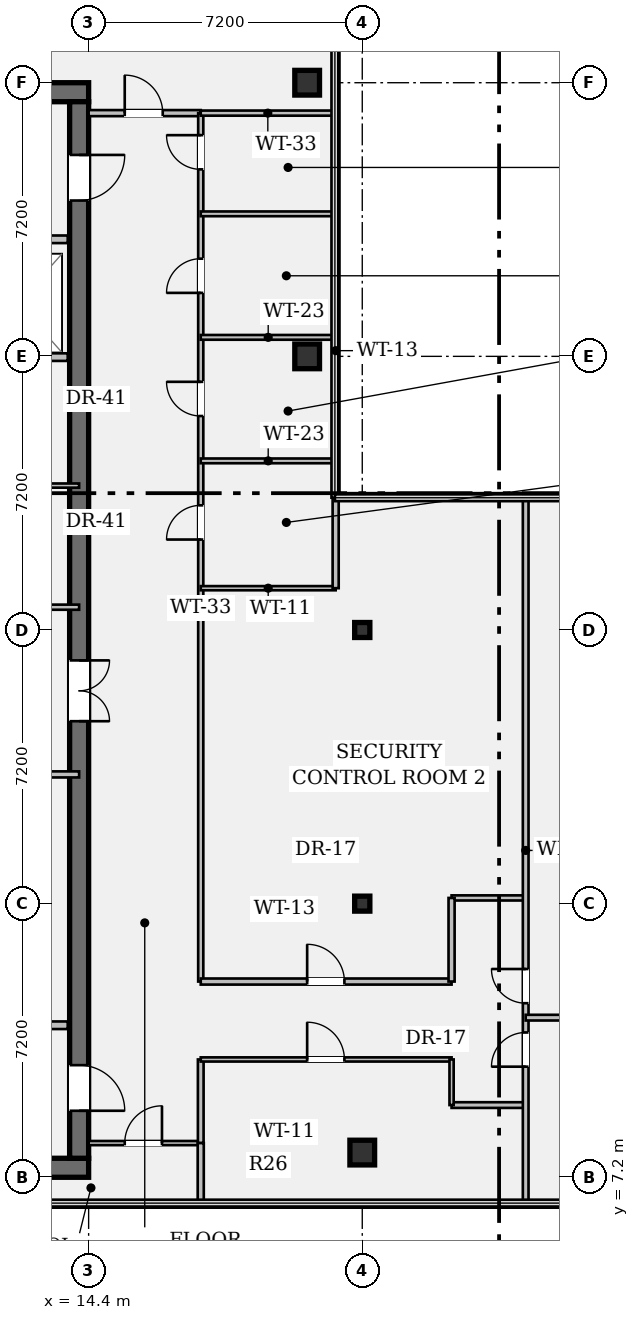
"""IFC4 building model, lengths in metres.
Left out: names, types, materials, properties, quantities, classifications, styles, units other than length and angle.
Written with IfcOpenShell. Run it as: python <this file> out.ifc"""

import sys

from ifc_helpers import new_model, si_unit, direction, frame, frame_2d, origin, origin_2d, place, context, subcontext, project, spatial, rectangle, hollow_rectangle, i_section, extrude, element, fill, save


model = new_model("IFC4")
c1 = context("Model", 3, precision=1e-05, world=origin(), true_north=direction((0.0, 1.0)))
c2 = subcontext(c1, "Body", "Model", "MODEL_VIEW")
j1 = project(units=[si_unit("LENGTHUNIT", "METRE"), si_unit("PLANEANGLEUNIT", "RADIAN")], contexts=[c1])
p1 = place(None, origin())
s1 = spatial("IfcSite", under=j1, at=p1, CompositionType="ELEMENT")
p2 = place(p1, origin())
s2 = spatial("IfcBuilding", under=s1, at=p2, CompositionType="ELEMENT")
p3 = place(p2, frame((0.0, 0.0, 248.15)))
s3 = spatial("IfcBuildingStorey", under=s2, at=p3, CompositionType="ELEMENT", Elevation=248.15)
for number, where, z_axis, x_axis in (
    (1, (0.5, 7.45, 0.0), (0.0, 0.0, 1.0), (1.0, 0.0, 0.0)),
    (2, (0.5, 35.75, 0.0), (0.0, 0.0, 1.0), (1.0, 0.0, 0.0)),
):
    element("IfcWall", number, at=place(p3, frame(where, z_axis=z_axis, x_axis=x_axis)), inside=s3, PredefinedType="SHEAR", context=c2, shape_type="SweptSolid", body=[
        extrude(rectangle(XDim=13.9, YDim=0.5, at=frame_2d((6.95, 0.0))), origin(), (0.0, 0.0, 1.0), 3.24),
    ])
p4 = place(p3, frame((14.15, 35.5, 0.0), z_axis=(0.0, 0.0, 1.0), x_axis=(0.0, -1.0, 0.0)))
e3 = element("IfcWall", 3, at=p4, inside=s3, PredefinedType="SHEAR", context=c2, shape_type="SweptSolid", body=[
    extrude(rectangle(XDim=27.8, YDim=0.5, at=frame_2d((13.9, 0.0))), origin(), (0.0, 0.0, 1.0), 3.24),
])
p5 = place(p4, frame((1.4, 0.0, 0.0)))
e4 = element("IfcOpeningElement", 4, at=p5, cuts=e3, PredefinedType="OPENING", context=c2, shape_type="SweptSolid", body=[
    extrude(rectangle(XDim=1.2, YDim=2.15, at=frame_2d((0.6, 1.075))), frame((0.0, 0.262, 0.0), z_axis=(0.0, -1.0, 0.0), x_axis=(1.0, 0.0, 0.0)), (0.0, 0.0, 1.0), 0.524),
])
p6 = place(p4, frame((25.35, 0.0, 0.0)))
e5 = element("IfcOpeningElement", 5, at=p6, cuts=e3, PredefinedType="OPENING", context=c2, shape_type="SweptSolid", body=[
    extrude(rectangle(XDim=1.2, YDim=2.15, at=frame_2d((0.6, 1.075))), frame((0.0, 0.262, 0.0), z_axis=(0.0, -1.0, 0.0), x_axis=(1.0, 0.0, 0.0)), (0.0, 0.0, 1.0), 0.524),
])
p7 = place(p4, frame((14.7, 0.0, 0.0)))
e6 = element("IfcOpeningElement", 6, at=p7, cuts=e3, PredefinedType="OPENING", context=c2, shape_type="SweptSolid", body=[
    extrude(rectangle(XDim=1.6, YDim=2.2, at=frame_2d((0.8, 1.1))), frame((0.0, 0.262, 0.0), z_axis=(0.0, -1.0, 0.0), x_axis=(1.0, 0.0, 0.0)), (0.0, 0.0, 1.0), 0.524),
])
for number, where, z_axis, x_axis in (
    (7, (20.15, 28.8, 0.0), (0.0, 0.0, 1.0), (1.0, 0.0, 0.0)),
    (8, (20.15, 36.0, 0.0), (0.0, 0.0, 1.0), (1.0, 0.0, 0.0)),
    (9, (21.6, 7.85, 0.0), (0.0, 0.0, 1.0), (1.0, 0.0, 0.0)),
):
    element("IfcColumn", number, at=place(p3, frame(where, z_axis=z_axis, x_axis=x_axis)), inside=s3, PredefinedType="COLUMN", context=c2, shape_type="SweptSolid", body=[
        extrude(hollow_rectangle(XDim=0.65, YDim=0.65, WallThickness=0.04, at=origin_2d()), origin(), (0.0, 0.0, 1.0), 3.24),
    ])
for number, where, z_axis, x_axis in (
    (10, (21.6, 14.4, 0.0), (0.0, 0.0, 1.0), (1.0, 0.0, 0.0)),
    (11, (21.6, 21.6, 0.0), (0.0, 0.0, 1.0), (1.0, 0.0, 0.0)),
):
    element("IfcColumn", number, at=place(p3, frame(where, z_axis=z_axis, x_axis=x_axis)), inside=s3, PredefinedType="COLUMN", context=c2, shape_type="SweptSolid", body=[
        extrude(i_section(OverallWidth=0.399, OverallDepth=0.394, WebThickness=0.023, FlangeThickness=0.037, FilletRadius=0.018, at=origin_2d()), origin(), (0.0, 0.0, 1.0), 3.24),
    ])
p8 = place(p3, frame((8.7, 31.88, 0.0), z_axis=(0.0, 0.0, 1.0), x_axis=(1.0, 0.0, 0.0)))
e12 = element("IfcWall", 12, at=p8, inside=s3, PredefinedType="PARTITIONING", context=c2, shape_type="SweptSolid", body=[
    extrude(rectangle(XDim=5.15, YDim=0.2, at=frame_2d((2.575, 0.0))), origin(), (0.0, 0.0, 1.0), 3.24),
])
p9 = place(p8, frame((0.75, 0.0, 0.0)))
e13 = element("IfcOpeningElement", 13, at=p9, cuts=e12, PredefinedType="OPENING", context=c2, shape_type="SweptSolid", body=[
    extrude(rectangle(XDim=1.2, YDim=2.2, at=frame_2d((0.6, 1.1))), frame((0.0, 0.112, 0.0), z_axis=(0.0, -1.0, 0.0), x_axis=(1.0, 0.0, 0.0)), (0.0, 0.0, 1.0), 0.224),
])
p10 = place(p8, frame((3.25, 0.0, 0.0)))
e14 = element("IfcOpeningElement", 14, at=p10, cuts=e12, PredefinedType="OPENING", context=c2, shape_type="SweptSolid", body=[
    extrude(rectangle(XDim=1.2, YDim=2.2, at=frame_2d((0.6, 1.1))), frame((0.0, 0.112, 0.0), z_axis=(0.0, -1.0, 0.0), x_axis=(1.0, 0.0, 0.0)), (0.0, 0.0, 1.0), 0.224),
])
for number, where, z_axis, x_axis in (
    (15, (8.7, 11.2, 0.0), (0.0, 0.0, 1.0), (1.0, 0.0, 0.0)),
    (16, (8.7, 28.78, 0.0), (0.0, 0.0, 1.0), (1.0, 0.0, 0.0)),
):
    element("IfcWall", number, at=place(p3, frame(where, z_axis=z_axis, x_axis=x_axis)), inside=s3, PredefinedType="PARTITIONING", context=c2, shape_type="SweptSolid", body=[
        extrude(rectangle(XDim=5.15, YDim=0.2, at=frame_2d((2.575, 0.0))), origin(), (0.0, 0.0, 1.0), 3.24),
    ])
p11 = place(p3, frame((7.1, 22.2, 0.0), z_axis=(0.0, 0.0, 1.0), x_axis=(1.0, 0.0, 0.0)))
e17 = element("IfcWall", 17, at=p11, inside=s3, PredefinedType="PARTITIONING", context=c2, shape_type="SweptSolid", body=[
    extrude(rectangle(XDim=7.05, YDim=0.135, at=frame_2d((3.525, 0.0))), origin(), (0.0, 0.0, 1.0), 3.24),
])
p12 = place(p3, frame((7.1, 25.4, 0.0), z_axis=(0.0, 0.0, 1.0), x_axis=(1.0, 0.0, 0.0)))
e18 = element("IfcWall", 18, at=p12, inside=s3, PredefinedType="PARTITIONING", context=c2, shape_type="SweptSolid", body=[
    extrude(rectangle(XDim=7.05, YDim=0.11, at=frame_2d((3.525, 0.0))), origin(), (0.0, 0.0, 1.0), 3.24),
])
p13 = place(p3, frame((5.15, 17.8, 0.0), z_axis=(0.0, 0.0, 1.0), x_axis=(1.0, 0.0, 0.0)))
e19 = element("IfcWall", 19, at=p13, inside=s3, PredefinedType="PARTITIONING", context=c2, shape_type="SweptSolid", body=[
    extrude(rectangle(XDim=9.0, YDim=0.16, at=frame_2d((4.5, 0.0))), origin(), (0.0, 0.0, 1.0), 3.24),
])
p14 = place(p13, frame((4.35, 0.0, 0.0)))
e20 = element("IfcOpeningElement", 20, at=p14, cuts=e19, PredefinedType="OPENING", context=c2, shape_type="SweptSolid", body=[
    extrude(rectangle(XDim=1.0, YDim=2.15, at=frame_2d((0.5, 1.075))), frame((0.0, 0.092, 0.0), z_axis=(0.0, -1.0, 0.0), x_axis=(1.0, 0.0, 0.0)), (0.0, 0.0, 1.0), 0.184),
])
p15 = place(p3, frame((14.4, 8.1, 0.0), z_axis=(0.0, 0.0, 1.0), x_axis=(1.0, 0.0, 0.0)))
e21 = element("IfcWall", 21, at=p15, inside=s3, PredefinedType="PARTITIONING", context=c2, shape_type="SweptSolid", body=[
    extrude(rectangle(XDim=2.95, YDim=0.11, at=frame_2d((1.475, 0.0))), origin(), (0.0, 0.0, 1.0), 3.24),
])
p16 = place(p15, frame((0.95, 0.0, 0.0)))
e22 = element("IfcOpeningElement", 22, at=p16, cuts=e21, PredefinedType="OPENING", context=c2, shape_type="SweptSolid", body=[
    extrude(rectangle(XDim=0.98, YDim=2.15, at=frame_2d((0.49, 1.075))), frame((0.0, 0.067, 0.0), z_axis=(0.0, -1.0, 0.0), x_axis=(1.0, 0.0, 0.0)), (0.0, 0.0, 1.0), 0.134),
])
p17 = place(p3, frame((14.4, 35.2, 0.0), z_axis=(0.0, 0.0, 1.0), x_axis=(1.0, 0.0, 0.0)))
e23 = element("IfcWall", 23, at=p17, inside=s3, PredefinedType="PARTITIONING", context=c2, shape_type="SweptSolid", body=[
    extrude(rectangle(XDim=2.95, YDim=0.16, at=frame_2d((1.475, 0.0))), origin(), (0.0, 0.0, 1.0), 2.808),
])
p18 = place(p17, frame((0.95, 0.0, 0.0)))
e24 = element("IfcOpeningElement", 24, at=p18, cuts=e23, PredefinedType="OPENING", context=c2, shape_type="SweptSolid", body=[
    extrude(rectangle(XDim=1.0, YDim=2.15, at=frame_2d((0.5, 1.075))), frame((0.0, 0.092, 0.0), z_axis=(0.0, -1.0, 0.0), x_axis=(1.0, 0.0, 0.0)), (0.0, 0.0, 1.0), 0.184),
])
p19 = place(p3, frame((17.35, 8.1, 0.0), z_axis=(0.0, 0.0, 1.0), x_axis=(0.0, 1.0, 0.0)))
e25 = element("IfcWall", 25, at=p19, inside=s3, PredefinedType="PARTITIONING", context=c2, shape_type="SweptSolid", body=[
    extrude(rectangle(XDim=2.2, YDim=0.15, at=frame_2d((1.1, 0.0))), origin(), (0.0, 0.0, 1.0), 3.24),
])
p20 = place(p3, frame((17.35, 12.35, 0.0), z_axis=(0.0, 0.0, 1.0), x_axis=(0.0, 1.0, 0.0)))
e26 = element("IfcWall", 26, at=p20, inside=s3, PredefinedType="PARTITIONING", context=c2, shape_type="SweptSolid", body=[
    extrude(rectangle(XDim=22.85, YDim=0.135, at=frame_2d((11.425, 0.0))), origin(), (0.0, 0.0, 1.0), 2.676),
])
p21 = place(p20, frame((11.63, 0.0, 0.0)))
e27 = element("IfcOpeningElement", 27, at=p21, cuts=e26, PredefinedType="OPENING", context=c2, shape_type="SweptSolid", body=[
    extrude(rectangle(XDim=0.9, YDim=2.15, at=frame_2d((0.45, 1.075))), frame((0.0, 0.08, 0.0), z_axis=(0.0, -1.0, 0.0), x_axis=(1.0, 0.0, 0.0)), (0.0, 0.0, 1.0), 0.159),
])
p22 = place(p20, frame((14.88, 0.0, 0.0)))
e28 = element("IfcOpeningElement", 28, at=p22, cuts=e26, PredefinedType="OPENING", context=c2, shape_type="SweptSolid", body=[
    extrude(rectangle(XDim=0.9, YDim=2.15, at=frame_2d((0.45, 1.075))), frame((0.0, 0.08, 0.0), z_axis=(0.0, -1.0, 0.0), x_axis=(1.0, 0.0, 0.0)), (0.0, 0.0, 1.0), 0.159),
])
p23 = place(p20, frame((18.12, 0.0, 0.0)))
e29 = element("IfcOpeningElement", 29, at=p23, cuts=e26, PredefinedType="OPENING", context=c2, shape_type="SweptSolid", body=[
    extrude(rectangle(XDim=0.9, YDim=2.15, at=frame_2d((0.45, 1.075))), frame((0.0, 0.08, 0.0), z_axis=(0.0, -1.0, 0.0), x_axis=(1.0, 0.0, 0.0)), (0.0, 0.0, 1.0), 0.159),
])
p24 = place(p20, frame((21.37, 0.0, 0.0)))
e30 = element("IfcOpeningElement", 30, at=p24, cuts=e26, PredefinedType="OPENING", context=c2, shape_type="SweptSolid", body=[
    extrude(rectangle(XDim=0.9, YDim=2.15, at=frame_2d((0.45, 1.075))), frame((0.0, 0.08, 0.0), z_axis=(0.0, -1.0, 0.0), x_axis=(1.0, 0.0, 0.0)), (0.0, 0.0, 1.0), 0.159),
])
p25 = place(p3, frame((17.35, 10.3, 0.0), z_axis=(0.0, 0.0, 1.0), x_axis=(1.0, 0.0, 0.0)))
e31 = element("IfcWall", 31, at=p25, inside=s3, PredefinedType="PARTITIONING", context=c2, shape_type="SweptSolid", body=[
    extrude(rectangle(XDim=6.6, YDim=0.11, at=frame_2d((3.3, 0.0))), origin(), (0.0, 0.0, 1.0), 2.676),
])
p26 = place(p25, frame((2.8, 0.0, 0.0)))
e32 = element("IfcOpeningElement", 32, at=p26, cuts=e31, PredefinedType="OPENING", context=c2, shape_type="SweptSolid", body=[
    extrude(rectangle(XDim=0.98, YDim=2.15, at=frame_2d((0.49, 1.075))), frame((0.0, 0.067, 0.0), z_axis=(0.0, -1.0, 0.0), x_axis=(1.0, 0.0, 0.0)), (0.0, 0.0, 1.0), 0.134),
])
p27 = place(p3, frame((17.35, 12.35, 0.0), z_axis=(0.0, 0.0, 1.0), x_axis=(1.0, 0.0, 0.0)))
e33 = element("IfcWall", 33, at=p27, inside=s3, PredefinedType="PARTITIONING", context=c2, shape_type="SweptSolid", body=[
    extrude(rectangle(XDim=6.6, YDim=0.16, at=frame_2d((3.3, 0.0))), origin(), (0.0, 0.0, 1.0), 2.676),
])
p28 = place(p27, frame((2.8, 0.0, 0.0)))
e34 = element("IfcOpeningElement", 34, at=p28, cuts=e33, PredefinedType="OPENING", context=c2, shape_type="SweptSolid", body=[
    extrude(rectangle(XDim=0.98, YDim=2.15, at=frame_2d((0.49, 1.075))), frame((0.0, 0.092, 0.0), z_axis=(0.0, -1.0, 0.0), x_axis=(1.0, 0.0, 0.0)), (0.0, 0.0, 1.0), 0.184),
])
p29 = place(p3, frame((23.95, 9.1, 0.0), z_axis=(0.0, 0.0, 1.0), x_axis=(1.0, 0.0, 0.0)))
e35 = element("IfcWall", 35, at=p29, inside=s3, PredefinedType="PARTITIONING", context=c2, shape_type="SweptSolid", body=[
    extrude(rectangle(XDim=1.95, YDim=0.15, at=frame_2d((0.975, 0.0))), origin(), (0.0, 0.0, 1.0), 2.808),
])
p30 = place(p3, frame((23.95, 14.55, 0.0), z_axis=(0.0, 0.0, 1.0), x_axis=(1.0, 0.0, 0.0)))
e36 = element("IfcWall", 36, at=p30, inside=s3, PredefinedType="PARTITIONING", context=c2, shape_type="SweptSolid", body=[
    extrude(rectangle(XDim=1.95, YDim=0.135, at=frame_2d((0.975, 0.0))), origin(), (0.0, 0.0, 1.0), 2.676),
])
p31 = place(p3, frame((23.95, 9.1, 0.0), z_axis=(0.0, 0.0, 1.0), x_axis=(0.0, 1.0, 0.0)))
e37 = element("IfcWall", 37, at=p31, inside=s3, PredefinedType="PARTITIONING", context=c2, shape_type="SweptSolid", body=[
    extrude(rectangle(XDim=1.2, YDim=0.11, at=frame_2d((0.6, 0.0))), origin(), (0.0, 0.0, 1.0), 2.808),
])
p32 = place(p3, frame((23.95, 12.35, 0.0), z_axis=(0.0, 0.0, 1.0), x_axis=(0.0, 1.0, 0.0)))
e38 = element("IfcWall", 38, at=p32, inside=s3, PredefinedType="PARTITIONING", context=c2, shape_type="SweptSolid", body=[
    extrude(rectangle(XDim=2.2, YDim=0.16, at=frame_2d((1.1, 0.0))), origin(), (0.0, 0.0, 1.0), 2.676),
])
p33 = place(p3, frame((25.9, 6.52, 0.0), z_axis=(0.0, 0.0, 1.0), x_axis=(0.0, 1.0, 0.0)))
e39 = element("IfcWall", 39, at=p33, inside=s3, PredefinedType="PARTITIONING", context=c2, shape_type="SweptSolid", body=[
    extrude(rectangle(XDim=18.56, YDim=0.15, at=frame_2d((9.28, 0.0))), origin(), (0.0, 0.0, 1.0), 2.676),
])
p34 = place(p33, frame((3.59, 0.0, 0.0)))
e40 = element("IfcOpeningElement", 40, at=p34, cuts=e39, PredefinedType="OPENING", context=c2, shape_type="SweptSolid", body=[
    extrude(rectangle(XDim=0.9, YDim=2.15, at=frame_2d((0.45, 1.075))), frame((0.0, 0.087, 0.0), z_axis=(0.0, -1.0, 0.0), x_axis=(1.0, 0.0, 0.0)), (0.0, 0.0, 1.0), 0.174),
])
p35 = place(p33, frame((5.26, 0.0, 0.0)))
e41 = element("IfcOpeningElement", 41, at=p35, cuts=e39, PredefinedType="OPENING", context=c2, shape_type="SweptSolid", body=[
    extrude(rectangle(XDim=0.9, YDim=2.15, at=frame_2d((0.45, 1.075))), frame((0.0, 0.087, 0.0), z_axis=(0.0, -1.0, 0.0), x_axis=(1.0, 0.0, 0.0)), (0.0, 0.0, 1.0), 0.174),
])
p36 = place(p3, frame((17.35, 35.2, 0.0), z_axis=(0.0, 0.0, 1.0), x_axis=(1.0, 0.0, 0.0)))
e42 = element("IfcWall", 42, at=p36, inside=s3, PredefinedType="PARTITIONING", context=c2, shape_type="SweptSolid", body=[
    extrude(rectangle(XDim=3.53, YDim=0.135, at=frame_2d((1.765, 0.0))), origin(), (0.0, 0.0, 1.0), 2.808),
])
p37 = place(p3, frame((17.35, 22.7, 0.0), z_axis=(0.0, 0.0, 1.0), x_axis=(1.0, 0.0, 0.0)))
e43 = element("IfcWall", 43, at=p37, inside=s3, PredefinedType="PARTITIONING", context=c2, shape_type="SweptSolid", body=[
    extrude(rectangle(XDim=3.55, YDim=0.11, at=frame_2d((1.775, 0.0))), origin(), (0.0, 0.0, 1.0), 2.808),
])
p38 = place(p3, frame((20.9, 22.7, 0.0), z_axis=(0.0, 0.0, 1.0), x_axis=(0.0, 1.0, 0.0)))
e44 = element("IfcWall", 44, at=p38, inside=s3, PredefinedType="PARTITIONING", context=c2, shape_type="SweptSolid", body=[
    extrude(rectangle(XDim=12.5, YDim=0.16, at=frame_2d((6.25, 0.0))), origin(), (0.0, 0.0, 1.0), 3.24),
])
for number, where, z_axis, x_axis in (
    (45, (17.35, 26.05, 0.0), (0.0, 0.0, 1.0), (1.0, 0.0, 0.0)),
    (46, (17.35, 29.3, 0.0), (0.0, 0.0, 1.0), (1.0, 0.0, 0.0)),
    (47, (17.35, 32.55, 0.0), (0.0, 0.0, 1.0), (1.0, 0.0, 0.0)),
):
    element("IfcWall", number, at=place(p3, frame(where, z_axis=z_axis, x_axis=x_axis)), inside=s3, PredefinedType="PARTITIONING", context=c2, shape_type="SweptSolid", body=[
        extrude(rectangle(XDim=3.55, YDim=0.125, at=frame_2d((1.775, 0.0))), origin(), (0.0, 0.0, 1.0), 2.808),
    ])
p39 = place(p3, frame((17.35, 6.52, 0.0), z_axis=(0.0, 0.0, 1.0), x_axis=(0.0, 1.0, 0.0)))
e48 = element("IfcWall", 48, at=p39, inside=s3, PredefinedType="PARTITIONING", context=c2, shape_type="SweptSolid", body=[
    extrude(rectangle(XDim=1.58, YDim=0.16, at=frame_2d((0.79, 0.0))), origin(), (0.0, 0.0, 1.0), 3.24),
])
p40 = place(p3, frame((25.9, 11.4, 0.0), z_axis=(0.0, 0.0, 1.0), x_axis=(1.0, 0.0, 0.0)))
e49 = element("IfcWall", 49, at=p40, inside=s3, PredefinedType="PARTITIONING", context=c2, shape_type="SweptSolid", body=[
    extrude(rectangle(XDim=19.58, YDim=0.15, at=frame_2d((9.79, 0.0))), origin(), (0.0, 0.0, 1.0), 2.676),
])
p41 = place(p5, origin())
e50 = element("IfcDoor", 50, at=p41, inside=s3, OperationType="SINGLE_SWING_LEFT", PredefinedType="DOOR", context=c2, shape_type="SweptSolid", body=[
    extrude(rectangle(XDim=1.2, YDim=2.15, at=frame_2d((0.6, 1.075))), frame((0.0, 0.025, 0.0), z_axis=(0.0, -1.0, 0.0), x_axis=(1.0, 0.0, 0.0)), (0.0, 0.0, 1.0), 0.05),
])
fill(e4, e50)
p42 = place(p6, origin())
e51 = element("IfcDoor", 51, at=p42, inside=s3, OperationType="SINGLE_SWING_RIGHT", PredefinedType="DOOR", context=c2, shape_type="SweptSolid", body=[
    extrude(rectangle(XDim=1.2, YDim=2.15, at=frame_2d((0.6, 1.075))), frame((0.0, 0.025, 0.0), z_axis=(0.0, -1.0, 0.0), x_axis=(1.0, 0.0, 0.0)), (0.0, 0.0, 1.0), 0.05),
])
fill(e5, e51)
p43 = place(p7, origin())
e52 = element("IfcDoor", 52, at=p43, inside=s3, OperationType="DOUBLE_DOOR_SINGLE_SWING", PredefinedType="DOOR", context=c2, shape_type="SweptSolid", body=[
    extrude(rectangle(XDim=1.6, YDim=2.2, at=frame_2d((0.8, 1.1))), frame((0.0, 0.025, 0.0), z_axis=(0.0, -1.0, 0.0), x_axis=(1.0, 0.0, 0.0)), (0.0, 0.0, 1.0), 0.05),
])
fill(e6, e52)
p44 = place(p18, origin())
e53 = element("IfcDoor", 53, at=p44, inside=s3, OperationType="SINGLE_SWING_LEFT", PredefinedType="DOOR", context=c2, shape_type="SweptSolid", body=[
    extrude(rectangle(XDim=1.0, YDim=2.15, at=frame_2d((0.5, 1.075))), frame((0.0, 0.025, 0.0), z_axis=(0.0, -1.0, 0.0), x_axis=(1.0, 0.0, 0.0)), (0.0, 0.0, 1.0), 0.05),
])
fill(e24, e53)
p45 = place(p21, origin())
e54 = element("IfcDoor", 54, at=p45, inside=s3, OperationType="SINGLE_SWING_LEFT", PredefinedType="DOOR", context=c2, shape_type="SweptSolid", body=[
    extrude(rectangle(XDim=0.9, YDim=2.15, at=frame_2d((0.45, 1.075))), frame((0.0, 0.025, 0.0), z_axis=(0.0, -1.0, 0.0), x_axis=(1.0, 0.0, 0.0)), (0.0, 0.0, 1.0), 0.05),
])
fill(e27, e54)
p46 = place(p22, origin())
e55 = element("IfcDoor", 55, at=p46, inside=s3, OperationType="SINGLE_SWING_RIGHT", PredefinedType="DOOR", context=c2, shape_type="SweptSolid", body=[
    extrude(rectangle(XDim=0.9, YDim=2.15, at=frame_2d((0.45, 1.075))), frame((0.0, 0.025, 0.0), z_axis=(0.0, -1.0, 0.0), x_axis=(1.0, 0.0, 0.0)), (0.0, 0.0, 1.0), 0.05),
])
fill(e28, e55)
p47 = place(p23, origin())
e56 = element("IfcDoor", 56, at=p47, inside=s3, OperationType="SINGLE_SWING_LEFT", PredefinedType="DOOR", context=c2, shape_type="SweptSolid", body=[
    extrude(rectangle(XDim=0.9, YDim=2.15, at=frame_2d((0.45, 1.075))), frame((0.0, 0.025, 0.0), z_axis=(0.0, -1.0, 0.0), x_axis=(1.0, 0.0, 0.0)), (0.0, 0.0, 1.0), 0.05),
])
fill(e29, e56)
p48 = place(p24, origin())
e57 = element("IfcDoor", 57, at=p48, inside=s3, OperationType="SINGLE_SWING_RIGHT", PredefinedType="DOOR", context=c2, shape_type="SweptSolid", body=[
    extrude(rectangle(XDim=0.9, YDim=2.15, at=frame_2d((0.45, 1.075))), frame((0.0, 0.025, 0.0), z_axis=(0.0, -1.0, 0.0), x_axis=(1.0, 0.0, 0.0)), (0.0, 0.0, 1.0), 0.05),
])
fill(e30, e57)
p49 = place(p28, origin())
e58 = element("IfcDoor", 58, at=p49, inside=s3, OperationType="SINGLE_SWING_LEFT", PredefinedType="DOOR", context=c2, shape_type="SweptSolid", body=[
    extrude(rectangle(XDim=0.98, YDim=2.15, at=frame_2d((0.49, 1.075))), frame((0.0, 0.025, 0.0), z_axis=(0.0, -1.0, 0.0), x_axis=(1.0, 0.0, 0.0)), (0.0, 0.0, 1.0), 0.05),
])
fill(e34, e58)
p50 = place(p16, origin())
e59 = element("IfcDoor", 59, at=p50, inside=s3, OperationType="SINGLE_SWING_RIGHT", PredefinedType="DOOR", context=c2, shape_type="SweptSolid", body=[
    extrude(rectangle(XDim=0.98, YDim=2.15, at=frame_2d((0.49, 1.075))), frame((0.0, 0.025, 0.0), z_axis=(0.0, -1.0, 0.0), x_axis=(1.0, 0.0, 0.0)), (0.0, 0.0, 1.0), 0.05),
])
fill(e22, e59)
p51 = place(p26, origin())
e60 = element("IfcDoor", 60, at=p51, inside=s3, OperationType="SINGLE_SWING_LEFT", PredefinedType="DOOR", context=c2, shape_type="SweptSolid", body=[
    extrude(rectangle(XDim=0.98, YDim=2.15, at=frame_2d((0.49, 1.075))), frame((0.0, 0.025, 0.0), z_axis=(0.0, -1.0, 0.0), x_axis=(1.0, 0.0, 0.0)), (0.0, 0.0, 1.0), 0.05),
])
fill(e32, e60)
p52 = place(p34, origin())
e61 = element("IfcDoor", 61, at=p52, inside=s3, OperationType="SINGLE_SWING_LEFT", PredefinedType="DOOR", context=c2, shape_type="SweptSolid", body=[
    extrude(rectangle(XDim=0.9, YDim=2.15, at=frame_2d((0.45, 1.075))), frame((0.0, 0.025, 0.0), z_axis=(0.0, -1.0, 0.0), x_axis=(1.0, 0.0, 0.0)), (0.0, 0.0, 1.0), 0.05),
])
fill(e40, e61)
p53 = place(p35, origin())
e62 = element("IfcDoor", 62, at=p53, inside=s3, OperationType="SINGLE_SWING_RIGHT", PredefinedType="DOOR", context=c2, shape_type="SweptSolid", body=[
    extrude(rectangle(XDim=0.9, YDim=2.15, at=frame_2d((0.45, 1.075))), frame((0.0, 0.025, 0.0), z_axis=(0.0, -1.0, 0.0), x_axis=(1.0, 0.0, 0.0)), (0.0, 0.0, 1.0), 0.05),
])
fill(e41, e62)
save(model, sys.argv[1])
